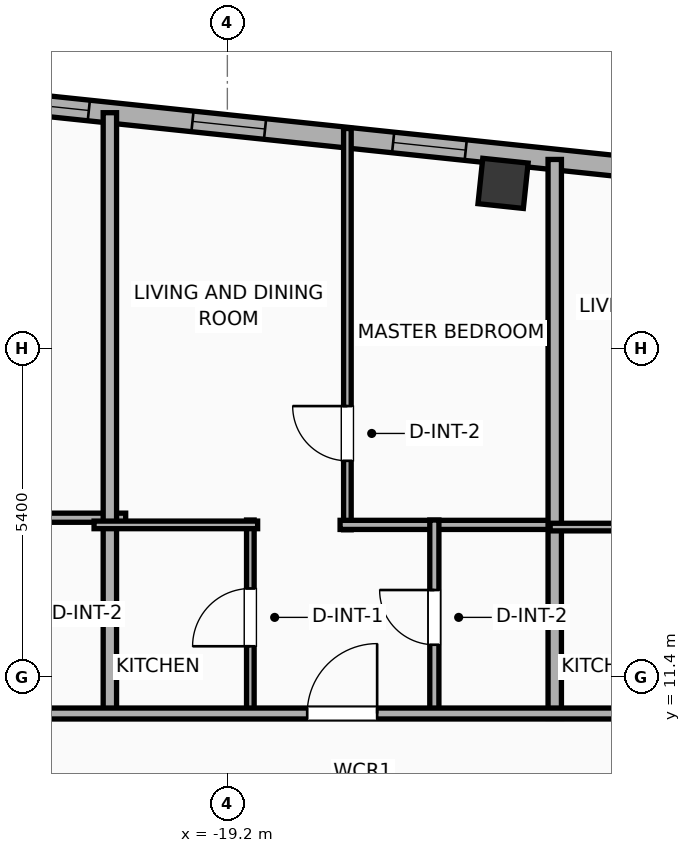
"""IFC4 building model, lengths in metres.
Left out: names, types, materials, properties, quantities, classifications, styles, units other than length and angle.
Written with IfcOpenShell. Run it as: python <this file> out.ifc"""

import sys

from ifc_helpers import new_model, si_unit, direction, frame, frame_2d, origin, origin_2d, place, context, subcontext, project, spatial, rectangle, hollow_rectangle, extrude, element, fill, save


model = new_model("IFC4")
c1 = context("Model", 3, precision=1e-05, world=origin(), true_north=direction((0.0, 1.0)))
c2 = subcontext(c1, "Body", "Model", "MODEL_VIEW")
j1 = project(units=[si_unit("LENGTHUNIT", "METRE"), si_unit("PLANEANGLEUNIT", "RADIAN")], contexts=[c1])
p1 = place(None, origin())
s1 = spatial("IfcSite", under=j1, at=p1, CompositionType="ELEMENT")
p2 = place(p1, origin())
s2 = spatial("IfcBuilding", under=s1, at=p2, CompositionType="ELEMENT")
p3 = place(p2, frame((0.0, 0.0, 279.5)))
s3 = spatial("IfcBuildingStorey", under=s2, at=p3, CompositionType="ELEMENT", Elevation=279.5)
p4 = place(p3, frame((-14.666, 19.518, 0.0), z_axis=(0.0, 0.0, 1.0), x_axis=(0.994521895368, -0.104528463268, 0.0)))
e1 = element("IfcColumn", 1, at=p4, inside=s3, PredefinedType="COLUMN", context=c2, shape_type="SweptSolid", body=[
    extrude(hollow_rectangle(XDim=0.75, YDim=0.75, WallThickness=0.025, at=origin_2d()), origin(), (0.0, 0.0, 1.0), 3.9),
])
p5 = place(p3, frame((-23.908, 20.972, 0.0), z_axis=(0.0, 0.0, 1.0), x_axis=(0.994521888554, -0.104528528102, 0.0)))
e2 = element("IfcWall", 2, at=p5, inside=s3, PredefinedType="ELEMENTEDWALL", context=c2, shape_type="SweptSolid", body=[
    extrude(rectangle(XDim=46.766, YDim=0.34, at=frame_2d((23.383, 0.0))), origin(), (0.0, 0.0, 1.0), 3.65),
])
p6 = place(p5, frame((23.833, 0.0, 0.75)))
e3 = element("IfcOpeningElement", 3, at=p6, cuts=e2, PredefinedType="OPENING", context=c2, shape_type="SweptSolid", body=[
    extrude(rectangle(XDim=2.4, YDim=2.1, at=frame_2d((1.2, 1.05))), frame((0.0, 0.18, 0.0), z_axis=(0.0, -1.0, 0.0), x_axis=(1.0, 0.0, 0.0)), (0.0, 0.0, 1.0), 0.36),
])
p7 = place(p5, frame((1.243, 0.0, 0.75)))
e4 = element("IfcOpeningElement", 4, at=p7, cuts=e2, PredefinedType="OPENING", context=c2, shape_type="SweptSolid", body=[
    extrude(rectangle(XDim=1.2, YDim=2.05, at=frame_2d((0.6, 1.025))), frame((0.0, 0.18, 0.0), z_axis=(0.0, -1.0, 0.0), x_axis=(1.0, 0.0, 0.0)), (0.0, 0.0, 1.0), 0.36),
])
p8 = place(p5, frame((4.157, 0.0, 0.75)))
e5 = element("IfcOpeningElement", 5, at=p8, cuts=e2, PredefinedType="OPENING", context=c2, shape_type="SweptSolid", body=[
    extrude(rectangle(XDim=1.2, YDim=2.05, at=frame_2d((0.6, 1.025))), frame((0.0, 0.18, 0.0), z_axis=(0.0, -1.0, 0.0), x_axis=(1.0, 0.0, 0.0)), (0.0, 0.0, 1.0), 0.36),
])
p9 = place(p5, frame((7.475, 0.0, 0.75)))
e6 = element("IfcOpeningElement", 6, at=p9, cuts=e2, PredefinedType="OPENING", context=c2, shape_type="SweptSolid", body=[
    extrude(rectangle(XDim=1.2, YDim=2.05, at=frame_2d((0.6, 1.025))), frame((0.0, 0.18, 0.0), z_axis=(0.0, -1.0, 0.0), x_axis=(1.0, 0.0, 0.0)), (0.0, 0.0, 1.0), 0.36),
])
p10 = place(p5, frame((11.513, 0.0, 0.75)))
e7 = element("IfcOpeningElement", 7, at=p10, cuts=e2, PredefinedType="OPENING", context=c2, shape_type="SweptSolid", body=[
    extrude(rectangle(XDim=1.2, YDim=2.05, at=frame_2d((0.6, 1.025))), frame((0.0, 0.18, 0.0), z_axis=(0.0, -1.0, 0.0), x_axis=(1.0, 0.0, 0.0)), (0.0, 0.0, 1.0), 0.36),
])
p11 = place(p5, frame((15.192, 0.0, 0.75)))
e8 = element("IfcOpeningElement", 8, at=p11, cuts=e2, PredefinedType="OPENING", context=c2, shape_type="SweptSolid", body=[
    extrude(rectangle(XDim=1.2, YDim=2.05, at=frame_2d((0.6, 1.025))), frame((0.0, 0.18, 0.0), z_axis=(0.0, -1.0, 0.0), x_axis=(1.0, 0.0, 0.0)), (0.0, 0.0, 1.0), 0.36),
])
p12 = place(p5, frame((19.671, 0.0, 0.75)))
e9 = element("IfcOpeningElement", 9, at=p12, cuts=e2, PredefinedType="OPENING", context=c2, shape_type="SweptSolid", body=[
    extrude(rectangle(XDim=1.2, YDim=2.05, at=frame_2d((0.6, 1.025))), frame((0.0, 0.18, 0.0), z_axis=(0.0, -1.0, 0.0), x_axis=(1.0, 0.0, 0.0)), (0.0, 0.0, 1.0), 0.36),
])
p13 = place(p5, frame((29.801, 0.0, 0.75)))
e10 = element("IfcOpeningElement", 10, at=p13, cuts=e2, PredefinedType="OPENING", context=c2, shape_type="SweptSolid", body=[
    extrude(rectangle(XDim=1.2, YDim=2.05, at=frame_2d((0.6, 1.025))), frame((0.0, 0.18, 0.0), z_axis=(0.0, -1.0, 0.0), x_axis=(1.0, 0.0, 0.0)), (0.0, 0.0, 1.0), 0.36),
])
p14 = place(p5, frame((33.35, 0.0, 0.75)))
e11 = element("IfcOpeningElement", 11, at=p14, cuts=e2, PredefinedType="OPENING", context=c2, shape_type="SweptSolid", body=[
    extrude(rectangle(XDim=1.2, YDim=2.05, at=frame_2d((0.6, 1.025))), frame((0.0, 0.18, 0.0), z_axis=(0.0, -1.0, 0.0), x_axis=(1.0, 0.0, 0.0)), (0.0, 0.0, 1.0), 0.36),
])
p15 = place(p5, frame((38.034, 0.0, 0.75)))
e12 = element("IfcOpeningElement", 12, at=p15, cuts=e2, PredefinedType="OPENING", context=c2, shape_type="SweptSolid", body=[
    extrude(rectangle(XDim=0.85, YDim=2.05, at=frame_2d((0.425, 1.025))), frame((0.0, 0.18, 0.0), z_axis=(0.0, -1.0, 0.0), x_axis=(1.0, 0.0, 0.0)), (0.0, 0.0, 1.0), 0.36),
])
p16 = place(p5, frame((40.448, 0.0, 0.75)))
e13 = element("IfcOpeningElement", 13, at=p16, cuts=e2, PredefinedType="OPENING", context=c2, shape_type="SweptSolid", body=[
    extrude(rectangle(XDim=1.2, YDim=2.05, at=frame_2d((0.6, 1.025))), frame((0.0, 0.18, 0.0), z_axis=(0.0, -1.0, 0.0), x_axis=(1.0, 0.0, 0.0)), (0.0, 0.0, 1.0), 0.36),
])
p17 = place(p5, frame((43.718, 0.0, 0.75)))
e14 = element("IfcOpeningElement", 14, at=p17, cuts=e2, PredefinedType="OPENING", context=c2, shape_type="SweptSolid", body=[
    extrude(rectangle(XDim=1.2, YDim=2.05, at=frame_2d((0.6, 1.025))), frame((0.0, 0.18, 0.0), z_axis=(0.0, -1.0, 0.0), x_axis=(1.0, 0.0, 0.0)), (0.0, 0.0, 1.0), 0.36),
])
p18 = place(p3, frame((-24.662, 14.02, 0.0), z_axis=(0.0, 0.0, 1.0), x_axis=(1.0, 0.0, 0.0)))
e15 = element("IfcWall", 15, at=p18, inside=s3, PredefinedType="PLUMBINGWALL", context=c2, shape_type="SweptSolid", body=[
    extrude(rectangle(XDim=3.79, YDim=0.15, at=frame_2d((1.895, 0.0))), origin(), (0.0, 0.0, 1.0), 3.65),
])
p19 = place(p3, frame((-21.132, 10.72, 0.0), z_axis=(0.0, 0.0, 1.0), x_axis=(0.0, 1.0, 0.0)))
e16 = element("IfcWall", 16, at=p19, inside=s3, PredefinedType="PARTITIONING", context=c2, shape_type="SweptSolid", body=[
    extrude(rectangle(XDim=9.96, YDim=0.22, at=frame_2d((4.98, 0.0))), origin(), (0.0, 0.0, 1.0), 3.09),
])
p20 = place(p3, frame((-17.226, 13.822, 0.0), z_axis=(0.0, 0.0, 1.0), x_axis=(0.0, 1.0, 0.0)))
e17 = element("IfcWall", 17, at=p20, inside=s3, PredefinedType="PARTITIONING", context=c2, shape_type="SweptSolid", body=[
    extrude(rectangle(XDim=6.599, YDim=0.125, at=frame_2d((3.299, 0.0))), origin(), (0.0, 0.0, 1.0), 3.65),
])
p21 = place(p20, frame((1.134, 0.0, 0.0)))
e18 = element("IfcOpeningElement", 18, at=p21, cuts=e17, PredefinedType="OPENING", context=c2, shape_type="SweptSolid", body=[
    extrude(rectangle(XDim=0.9, YDim=2.05, at=frame_2d((0.45, 1.025))), frame((0.0, 0.073, 0.0), z_axis=(0.0, -1.0, 0.0), x_axis=(1.0, 0.0, 0.0)), (0.0, 0.0, 1.0), 0.145),
])
p22 = place(p3, frame((-17.346, 13.902, 0.0), z_axis=(0.0, 0.0, 1.0), x_axis=(1.0, 0.0, 0.0)))
e19 = element("IfcWall", 19, at=p22, inside=s3, PredefinedType="PLUMBINGWALL", context=c2, shape_type="SweptSolid", body=[
    extrude(rectangle(XDim=3.605, YDim=0.15, at=frame_2d((1.802, 0.0))), origin(), (0.0, 0.0, 1.0), 3.65),
])
p23 = place(p3, frame((-18.822, 10.78, 0.0), z_axis=(0.0, 0.0, 1.0), x_axis=(0.0, 1.0, 0.0)))
e20 = element("IfcWall", 20, at=p23, inside=s3, PredefinedType="PARTITIONING", context=c2, shape_type="SweptSolid", body=[
    extrude(rectangle(XDim=3.202, YDim=0.125, at=frame_2d((1.601, 0.0))), origin(), (0.0, 0.0, 1.0), 3.65),
])
p24 = place(p23, frame((1.126, 0.0, 0.0)))
e21 = element("IfcOpeningElement", 21, at=p24, cuts=e20, PredefinedType="OPENING", context=c2, shape_type="SweptSolid", body=[
    extrude(rectangle(XDim=0.95, YDim=2.05, at=frame_2d((0.475, 1.025))), frame((0.0, 0.073, 0.0), z_axis=(0.0, -1.0, 0.0), x_axis=(1.0, 0.0, 0.0)), (0.0, 0.0, 1.0), 0.145),
])
p25 = place(p3, frame((-21.392, 13.902, 0.0), z_axis=(0.0, 0.0, 1.0), x_axis=(1.0, 0.0, 0.0)))
e22 = element("IfcWall", 22, at=p25, inside=s3, PredefinedType="PARTITIONING", context=c2, shape_type="SweptSolid", body=[
    extrude(rectangle(XDim=2.69, YDim=0.125, at=frame_2d((1.345, 0.0))), origin(), (0.0, 0.0, 1.0), 3.65),
])
p26 = place(p3, frame((-15.796, 10.78, 0.0), z_axis=(0.0, 0.0, 1.0), x_axis=(0.0, 1.0, 0.0)))
e23 = element("IfcWall", 23, at=p26, inside=s3, PredefinedType="PLUMBINGWALL", context=c2, shape_type="SweptSolid", body=[
    extrude(rectangle(XDim=3.202, YDim=0.15, at=frame_2d((1.601, 0.0))), origin(), (0.0, 0.0, 1.0), 3.65),
])
p27 = place(p26, frame((1.151, 0.0, 0.0)))
e24 = element("IfcOpeningElement", 24, at=p27, cuts=e23, PredefinedType="OPENING", context=c2, shape_type="SweptSolid", body=[
    extrude(rectangle(XDim=0.9, YDim=2.05, at=frame_2d((0.45, 1.025))), frame((0.0, 0.085, 0.0), z_axis=(0.0, -1.0, 0.0), x_axis=(1.0, 0.0, 0.0)), (0.0, 0.0, 1.0), 0.17),
])
p28 = place(p3, frame((-13.816, 10.72, 0.0), z_axis=(0.0, 0.0, 1.0), x_axis=(0.0, 1.0, 0.0)))
e25 = element("IfcWall", 25, at=p28, inside=s3, PredefinedType="PARTITIONING", context=c2, shape_type="SweptSolid", body=[
    extrude(rectangle(XDim=9.192, YDim=0.22, at=frame_2d((4.596, 0.0))), origin(), (0.0, 0.0, 1.0), 3.65),
])
p29 = place(p3, frame((-13.891, 13.866, 0.0), z_axis=(0.0, 0.0, 1.0), x_axis=(1.0, 0.0, 0.0)))
e26 = element("IfcWall", 26, at=p29, inside=s3, PredefinedType="PARTITIONING", context=c2, shape_type="SweptSolid", body=[
    extrude(rectangle(XDim=2.505, YDim=0.125, at=frame_2d((1.252, 0.0))), origin(), (0.0, 0.0, 1.0), 3.65),
])
p30 = place(p3, frame((-28.443, 10.8, 0.0), z_axis=(0.0, 0.0, 1.0), x_axis=(1.0, 0.0, 0.0)))
e27 = element("IfcWall", 27, at=p30, inside=s3, PredefinedType="PARTITIONING", context=c2, shape_type="SweptSolid", body=[
    extrude(rectangle(XDim=53.956, YDim=0.18, at=frame_2d((26.978, 0.0))), origin(), (0.0, 0.0, 1.0), 3.65),
])
p31 = place(p30, frame((3.213, 0.0, 0.0)))
e28 = element("IfcOpeningElement", 28, at=p31, cuts=e27, PredefinedType="OPENING", context=c2, shape_type="SweptSolid", body=[
    extrude(rectangle(XDim=1.15, YDim=2.05, at=frame_2d((0.575, 1.025))), frame((0.0, 0.1, 0.0), z_axis=(0.0, -1.0, 0.0), x_axis=(1.0, 0.0, 0.0)), (0.0, 0.0, 1.0), 0.2),
])
p32 = place(p30, frame((10.556, 0.0, 0.0)))
e29 = element("IfcOpeningElement", 29, at=p32, cuts=e27, PredefinedType="OPENING", context=c2, shape_type="SweptSolid", body=[
    extrude(rectangle(XDim=1.15, YDim=2.05, at=frame_2d((0.575, 1.025))), frame((0.0, 0.1, 0.0), z_axis=(0.0, -1.0, 0.0), x_axis=(1.0, 0.0, 0.0)), (0.0, 0.0, 1.0), 0.2),
])
p33 = place(p30, frame((17.872, 0.0, 0.0)))
e30 = element("IfcOpeningElement", 30, at=p33, cuts=e27, PredefinedType="OPENING", context=c2, shape_type="SweptSolid", body=[
    extrude(rectangle(XDim=1.15, YDim=2.05, at=frame_2d((0.575, 1.025))), frame((0.0, 0.1, 0.0), z_axis=(0.0, -1.0, 0.0), x_axis=(1.0, 0.0, 0.0)), (0.0, 0.0, 1.0), 0.2),
])
p34 = place(p30, frame((24.45, 0.0, 0.0)))
e31 = element("IfcOpeningElement", 31, at=p34, cuts=e27, PredefinedType="OPENING", context=c2, shape_type="SweptSolid", body=[
    extrude(rectangle(XDim=0.9, YDim=2.05, at=frame_2d((0.45, 1.025))), frame((0.0, 0.1, 0.0), z_axis=(0.0, -1.0, 0.0), x_axis=(1.0, 0.0, 0.0)), (0.0, 0.0, 1.0), 0.2),
])
p35 = place(p30, frame((29.954, 0.0, 0.0)))
e32 = element("IfcOpeningElement", 32, at=p35, cuts=e27, PredefinedType="OPENING", context=c2, shape_type="SweptSolid", body=[
    extrude(rectangle(XDim=0.9, YDim=2.05, at=frame_2d((0.45, 1.025))), frame((0.0, 0.1, 0.0), z_axis=(0.0, -1.0, 0.0), x_axis=(1.0, 0.0, 0.0)), (0.0, 0.0, 1.0), 0.2),
])
p36 = place(p30, frame((36.186, 0.0, 0.0)))
e33 = element("IfcOpeningElement", 33, at=p36, cuts=e27, PredefinedType="OPENING", context=c2, shape_type="SweptSolid", body=[
    extrude(rectangle(XDim=0.9, YDim=2.05, at=frame_2d((0.45, 1.025))), frame((0.0, 0.1, 0.0), z_axis=(0.0, -1.0, 0.0), x_axis=(1.0, 0.0, 0.0)), (0.0, 0.0, 1.0), 0.2),
])
p37 = place(p30, frame((43.249, 0.0, 0.0)))
e34 = element("IfcOpeningElement", 34, at=p37, cuts=e27, PredefinedType="OPENING", context=c2, shape_type="SweptSolid", body=[
    extrude(rectangle(XDim=0.9, YDim=2.05, at=frame_2d((0.45, 1.025))), frame((0.0, 0.1, 0.0), z_axis=(0.0, -1.0, 0.0), x_axis=(1.0, 0.0, 0.0)), (0.0, 0.0, 1.0), 0.2),
])
p38 = place(p30, frame((50.311, 0.0, 0.0)))
e35 = element("IfcOpeningElement", 35, at=p38, cuts=e27, PredefinedType="OPENING", context=c2, shape_type="SweptSolid", body=[
    extrude(rectangle(XDim=0.9, YDim=2.05, at=frame_2d((0.45, 1.025))), frame((0.0, 0.1, 0.0), z_axis=(0.0, -1.0, 0.0), x_axis=(1.0, 0.0, 0.0)), (0.0, 0.0, 1.0), 0.2),
])
p39 = place(p7, origin())
e36 = element("IfcWindow", 36, at=p39, inside=s3, PartitioningType="SINGLE_PANEL", PredefinedType="WINDOW", context=c2, shape_type="SweptSolid", body=[
    extrude(rectangle(XDim=1.2, YDim=2.05, at=frame_2d((0.6, 1.025))), frame((0.0, 0.03, 0.0), z_axis=(0.0, -1.0, 0.0), x_axis=(1.0, 0.0, 0.0)), (0.0, 0.0, 1.0), 0.06),
])
fill(e4, e36)
p40 = place(p8, origin())
e37 = element("IfcWindow", 37, at=p40, inside=s3, PartitioningType="SINGLE_PANEL", PredefinedType="WINDOW", context=c2, shape_type="SweptSolid", body=[
    extrude(rectangle(XDim=1.2, YDim=2.05, at=frame_2d((0.6, 1.025))), frame((0.0, 0.03, 0.0), z_axis=(0.0, -1.0, 0.0), x_axis=(1.0, 0.0, 0.0)), (0.0, 0.0, 1.0), 0.06),
])
fill(e5, e37)
p41 = place(p9, origin())
e38 = element("IfcWindow", 38, at=p41, inside=s3, PartitioningType="SINGLE_PANEL", PredefinedType="WINDOW", context=c2, shape_type="SweptSolid", body=[
    extrude(rectangle(XDim=1.2, YDim=2.05, at=frame_2d((0.6, 1.025))), frame((0.0, 0.03, 0.0), z_axis=(0.0, -1.0, 0.0), x_axis=(1.0, 0.0, 0.0)), (0.0, 0.0, 1.0), 0.06),
])
fill(e6, e38)
p42 = place(p21, origin())
e39 = element("IfcDoor", 39, at=p42, inside=s3, OperationType="SINGLE_SWING_RIGHT", PredefinedType="DOOR", context=c2, shape_type="SweptSolid", body=[
    extrude(rectangle(XDim=0.9, YDim=2.05, at=frame_2d((0.45, 1.025))), frame((0.0, 0.025, 0.0), z_axis=(0.0, -1.0, 0.0), x_axis=(1.0, 0.0, 0.0)), (0.0, 0.0, 1.0), 0.05),
])
fill(e18, e39)
p43 = place(p24, origin())
e40 = element("IfcDoor", 40, at=p43, inside=s3, OperationType="SINGLE_SWING_LEFT", PredefinedType="DOOR", context=c2, shape_type="SweptSolid", body=[
    extrude(rectangle(XDim=0.95, YDim=2.05, at=frame_2d((0.475, 1.025))), frame((0.0, 0.025, 0.0), z_axis=(0.0, -1.0, 0.0), x_axis=(1.0, 0.0, 0.0)), (0.0, 0.0, 1.0), 0.05),
])
fill(e21, e40)
p44 = place(p27, origin())
e41 = element("IfcDoor", 41, at=p44, inside=s3, OperationType="SINGLE_SWING_RIGHT", PredefinedType="DOOR", context=c2, shape_type="SweptSolid", body=[
    extrude(rectangle(XDim=0.9, YDim=2.05, at=frame_2d((0.45, 1.025))), frame((0.0, 0.025, 0.0), z_axis=(0.0, -1.0, 0.0), x_axis=(1.0, 0.0, 0.0)), (0.0, 0.0, 1.0), 0.05),
])
fill(e24, e41)
p45 = place(p32, origin())
e42 = element("IfcDoor", 42, at=p45, inside=s3, OperationType="SINGLE_SWING_RIGHT", PredefinedType="DOOR", context=c2, shape_type="SweptSolid", body=[
    extrude(rectangle(XDim=1.15, YDim=2.05, at=frame_2d((0.575, 1.025))), frame((0.0, 0.025, 0.0), z_axis=(0.0, -1.0, 0.0), x_axis=(1.0, 0.0, 0.0)), (0.0, 0.0, 1.0), 0.05),
])
fill(e29, e42)
save(model, sys.argv[1])
